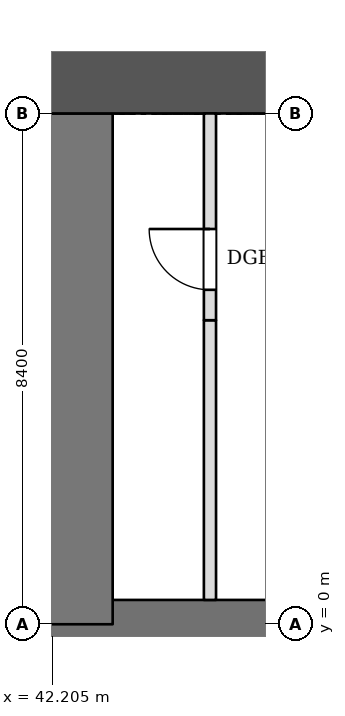
"""IFC4 building model, lengths in metres.
Left out: names, types, materials, properties, quantities, classifications, styles, units other than length and angle.
Written with IfcOpenShell. Run it as: python <this file> out.ifc"""

import sys

from ifc_helpers import new_model, si_unit, direction, frame, frame_2d, origin, place, context, subcontext, project, spatial, rectangle, extrude, element, fill, save


model = new_model("IFC4")
c1 = context("Model", 3, precision=1e-05, world=origin(), true_north=direction((0.0, 1.0)))
c2 = subcontext(c1, "Body", "Model", "MODEL_VIEW")
j1 = project(units=[si_unit("LENGTHUNIT", "METRE"), si_unit("PLANEANGLEUNIT", "RADIAN")], contexts=[c1])
p1 = place(None, origin())
s1 = spatial("IfcSite", under=j1, at=p1, CompositionType="ELEMENT")
p2 = place(p1, origin())
s2 = spatial("IfcBuilding", under=s1, at=p2, CompositionType="ELEMENT")
p3 = place(p2, frame((0.0, 0.0, -12.0)))
s3 = spatial("IfcBuildingStorey", under=s2, at=p3, CompositionType="ELEMENT", Elevation=-12.0)
p4 = place(p3, frame((-0.4, 0.0, 0.0), z_axis=(0.0, 0.0, 1.0), x_axis=(1.0, 0.0, 0.0)))
e1 = element("IfcWall", 1, at=p4, inside=s3, PredefinedType="SOLIDWALL", context=c2, shape_type="SweptSolid", body=[
    extrude(rectangle(XDim=67.6, YDim=0.8, at=frame_2d((33.8, 0.0))), origin(), (0.0, 0.0, 1.0), 3.7),
])
p5 = place(p3, frame((42.6, 0.0, 0.0), z_axis=(0.0, 0.0, 1.0), x_axis=(0.0, 1.0, 0.0)))
e2 = element("IfcWall", 2, at=p5, inside=s3, PredefinedType="SHEAR", context=c2, shape_type="SweptSolid", body=[
    extrude(rectangle(XDim=8.4, YDim=1.2, at=frame_2d((4.2, 0.0))), origin(), (0.0, 0.0, 1.0), 3.7),
])
p6 = place(p3, frame((42.0, 9.0, 0.0), z_axis=(0.0, 0.0, 1.0), x_axis=(1.0, 0.0, 0.0)))
e3 = element("IfcWall", 3, at=p6, inside=s3, PredefinedType="SHEAR", context=c2, shape_type="SweptSolid", body=[
    extrude(rectangle(XDim=16.8, YDim=1.2, at=frame_2d((8.4, 0.0))), origin(), (0.0, 0.0, 1.0), 3.7),
])
p7 = place(p3, frame((44.8, 0.4, 0.0), z_axis=(0.0, 0.0, 1.0), x_axis=(0.0, 1.0, 0.0)))
e4 = element("IfcWall", 4, at=p7, inside=s3, PredefinedType="PARTITIONING", context=c2, shape_type="SweptSolid", body=[
    extrude(rectangle(XDim=4.6, YDim=0.2, at=frame_2d((2.3, 0.0))), origin(), (0.0, 0.0, 1.0), 3.7),
])
p8 = place(p3, frame((44.8, 5.0, 0.0), z_axis=(0.0, 0.0, 1.0), x_axis=(0.0, 1.0, 0.0)))
e5 = element("IfcWall", 5, at=p8, inside=s3, PredefinedType="PARTITIONING", context=c2, shape_type="SweptSolid", body=[
    extrude(rectangle(XDim=3.4, YDim=0.2, at=frame_2d((1.7, 0.0))), origin(), (0.0, 0.0, 1.0), 3.7),
])
p9 = place(p8, frame((0.5, 0.0, 0.0)))
e6 = element("IfcOpeningElement", 6, at=p9, cuts=e5, PredefinedType="OPENING", context=c2, shape_type="SweptSolid", body=[
    extrude(rectangle(XDim=1.0, YDim=2.1, at=frame_2d((0.5, 1.05))), frame((0.0, 0.11, 0.0), z_axis=(0.0, -1.0, 0.0), x_axis=(1.0, 0.0, 0.0)), (0.0, 0.0, 1.0), 0.22),
])
p10 = place(p9, origin())
e7 = element("IfcDoor", 7, at=p10, inside=s3, OperationType="SINGLE_SWING_RIGHT", PredefinedType="DOOR", context=c2, shape_type="SweptSolid", body=[
    extrude(rectangle(XDim=1.0, YDim=2.1, at=frame_2d((0.5, 1.05))), frame((0.0, 0.025, 0.0), z_axis=(0.0, -1.0, 0.0), x_axis=(1.0, 0.0, 0.0)), (0.0, 0.0, 1.0), 0.05),
])
fill(e6, e7)
save(model, sys.argv[1])
